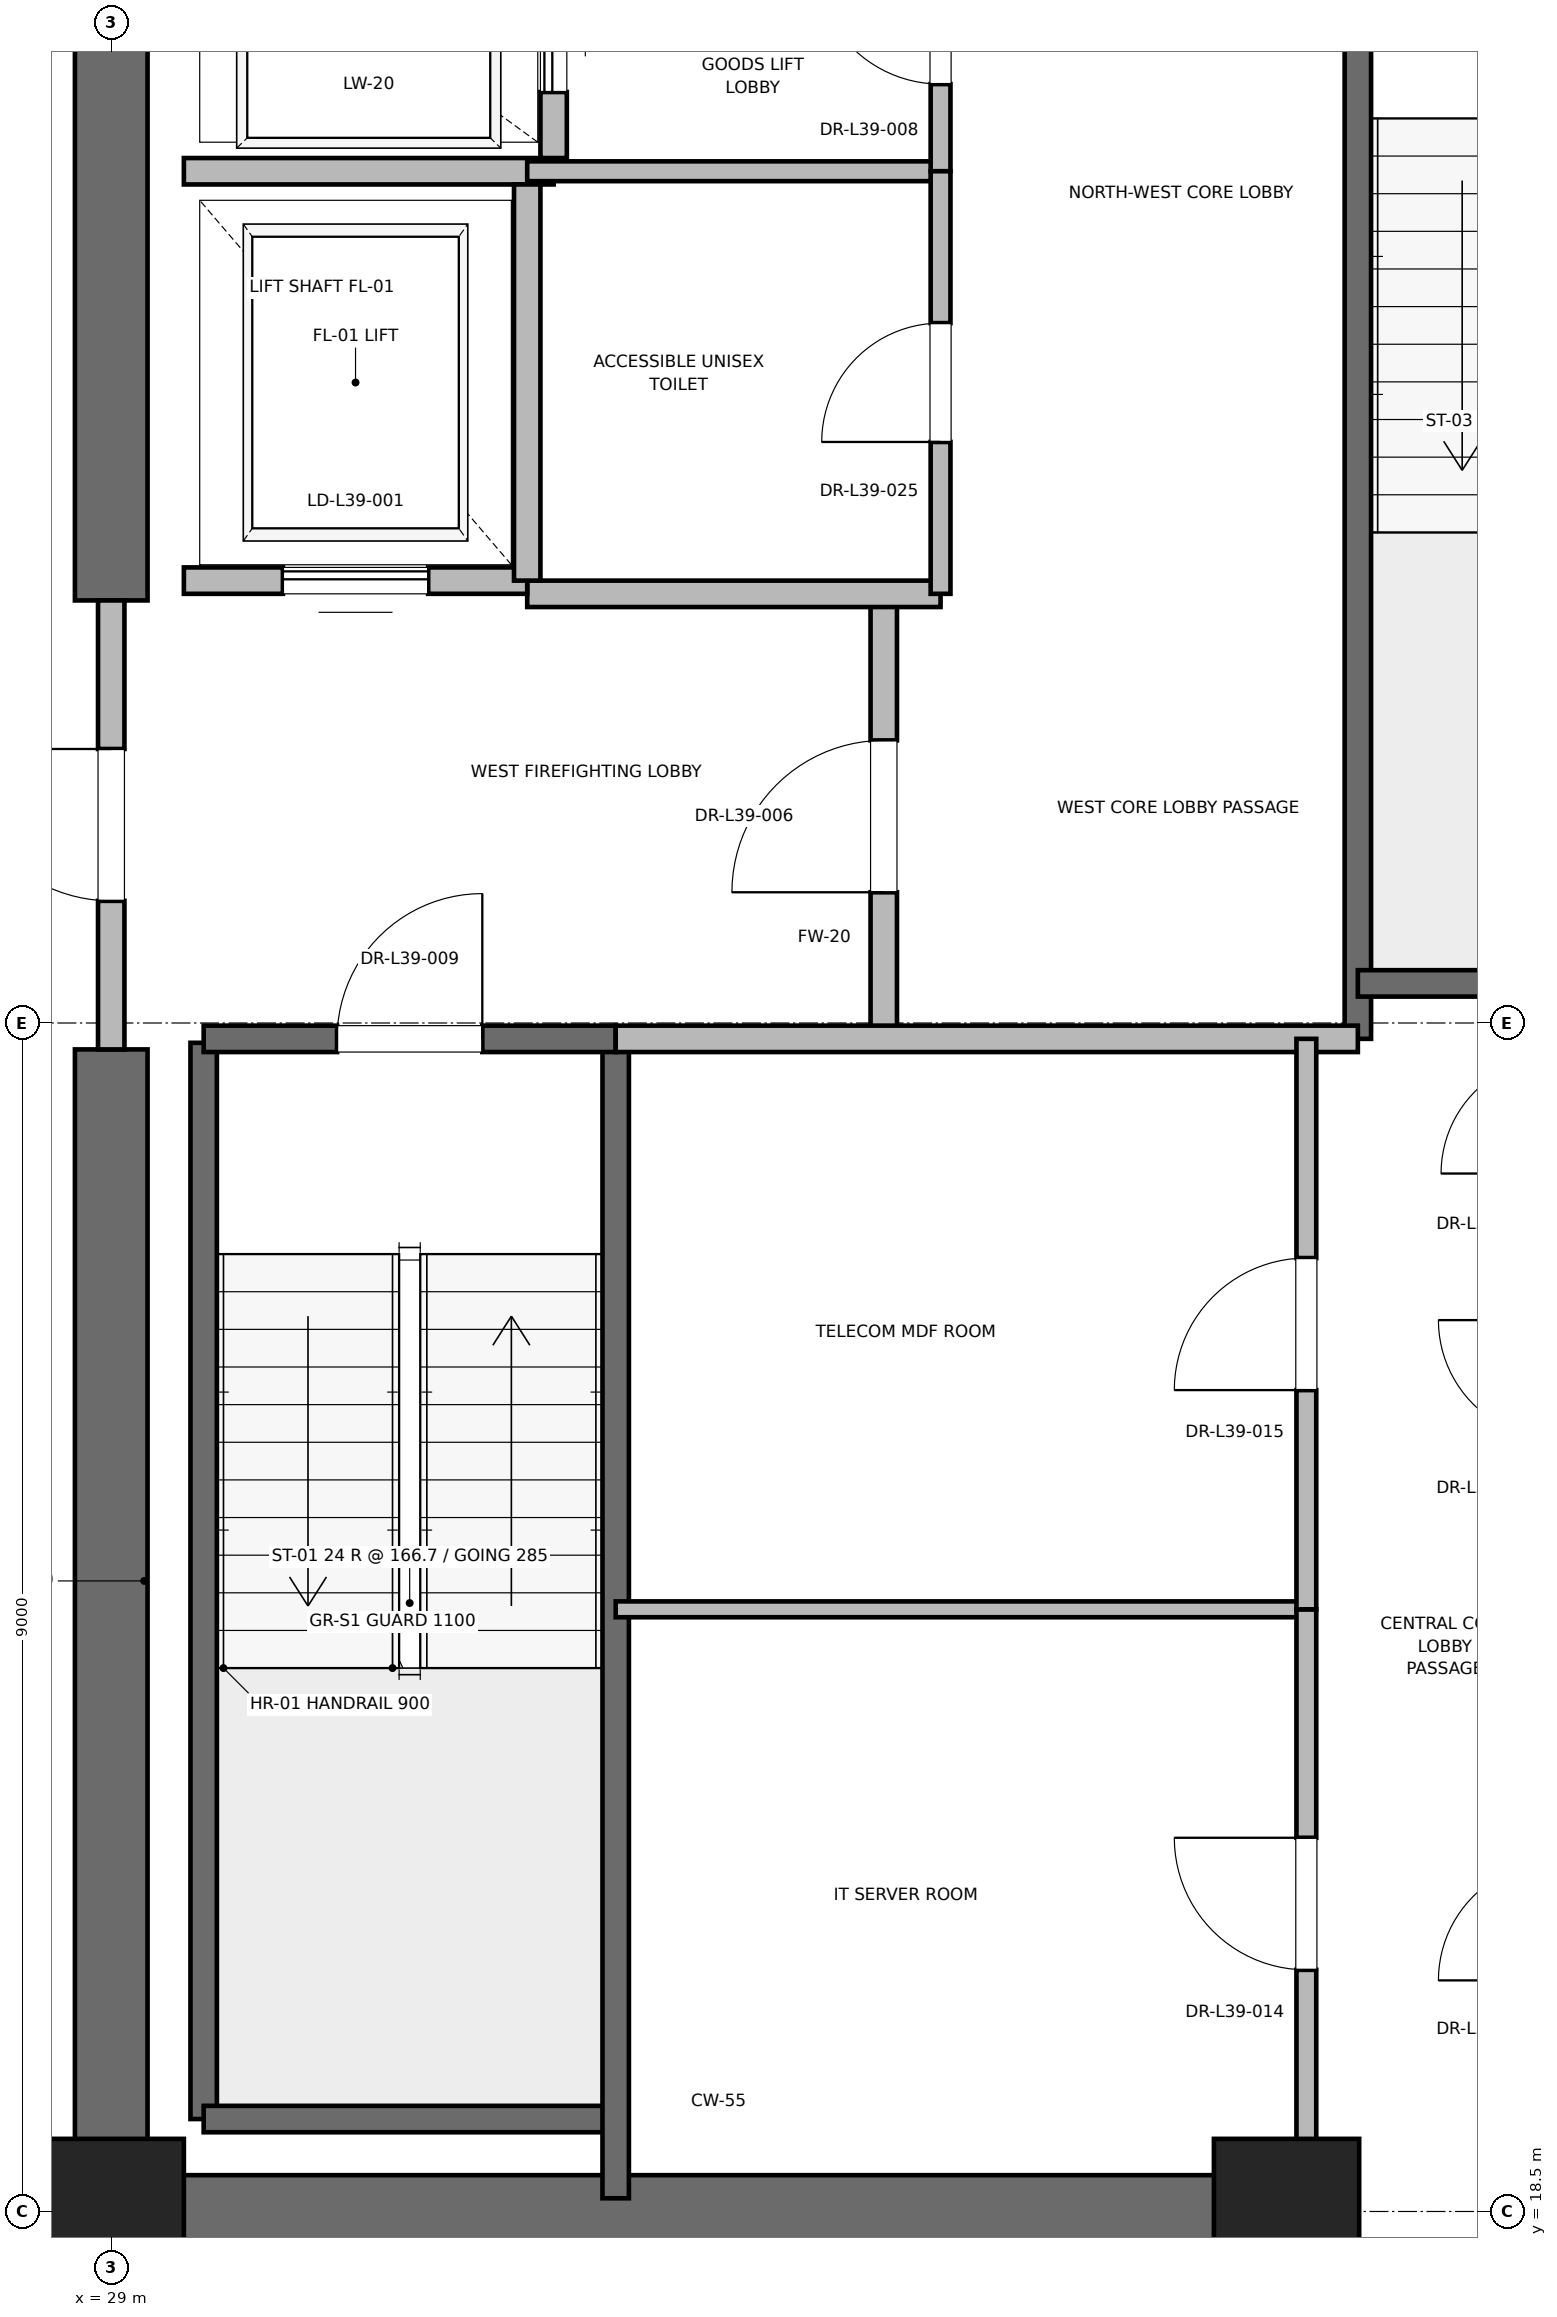
"""IFC4 building model, lengths in metres.
Left out: names, types, materials, properties, quantities, classifications, styles, units other than length and angle.
Written with IfcOpenShell. Run it as: python <this file> out.ifc"""

import sys

from ifc_helpers import new_model, si_unit, direction, frame, frame_2d, origin, origin_2d, place, context, subcontext, project, spatial, rectangle, extrude, element, fill, save


model = new_model("IFC4")
c1 = context("Model", 3, precision=1e-05, world=origin(), true_north=direction((0.0, 1.0)))
c2 = subcontext(c1, "Body", "Model", "MODEL_VIEW")
j1 = project(units=[si_unit("LENGTHUNIT", "METRE"), si_unit("PLANEANGLEUNIT", "RADIAN")], contexts=[c1])
p1 = place(None, origin())
s1 = spatial("IfcSite", under=j1, at=p1, CompositionType="ELEMENT")
p2 = place(p1, origin())
s2 = spatial("IfcBuilding", under=s1, at=p2, CompositionType="ELEMENT")
p3 = place(p2, frame((0.0, 0.0, 168.4)))
s3 = spatial("IfcBuildingStorey", under=s2, at=p3, CompositionType="ELEMENT", Elevation=168.4)
for number, where, z_axis, x_axis in (
    (1, (29.0, 18.5, 0.0), (0.0, 0.0, 1.0), (1.0, 0.0, 0.0)),
    (2, (37.9, 18.5, 0.0), (0.0, 0.0, 1.0), (1.0, 0.0, 0.0)),
):
    element("IfcColumn", number, at=place(p3, frame(where, z_axis=z_axis, x_axis=x_axis)), inside=s3, PredefinedType="PILASTER", context=c2, shape_type="SweptSolid", body=[
        extrude(rectangle(XDim=1.1, YDim=1.1, at=origin_2d()), origin(), (0.0, 0.0, 1.0), 4.0),
    ])
p4 = place(p3, frame((29.0, 18.5, 0.0), z_axis=(0.0, 0.0, 1.0), x_axis=(1.0, 0.0, 0.0)))
e3 = element("IfcWall", 3, at=p4, inside=s3, PredefinedType="SHEAR", context=c2, shape_type="SweptSolid", body=[
    extrude(rectangle(XDim=9.2, YDim=0.55, at=frame_2d((4.6, 0.0))), origin(), (0.0, 0.0, 1.0), 3.775),
])
p5 = place(p3, frame((29.0, 18.5, 0.0), z_axis=(0.0, 0.0, 1.0), x_axis=(0.0, 1.0, 0.0)))
e4 = element("IfcWall", 4, at=p5, inside=s3, PredefinedType="SHEAR", context=c2, shape_type="SweptSolid", body=[
    extrude(rectangle(XDim=8.8, YDim=0.55, at=frame_2d((4.4, 0.0))), origin(), (0.0, 0.0, 1.0), 3.775),
])
p6 = place(p3, frame((29.0, 30.7, 0.0), z_axis=(0.0, 0.0, 1.0), x_axis=(0.0, 1.0, 0.0)))
e5 = element("IfcWall", 5, at=p6, inside=s3, PredefinedType="SHEAR", context=c2, shape_type="SweptSolid", body=[
    extrude(rectangle(XDim=5.8, YDim=0.55, at=frame_2d((2.9, 0.0))), origin(), (0.0, 0.0, 1.0), 3.775),
])
p7 = place(p3, frame((29.7, 19.2, 0.0), z_axis=(0.0, 0.0, 1.0), x_axis=(0.0, 1.0, 0.0)))
e6 = element("IfcWall", 6, at=p7, inside=s3, PredefinedType="SOLIDWALL", context=c2, shape_type="SweptSolid", body=[
    extrude(rectangle(XDim=8.15, YDim=0.2, at=frame_2d((4.075, 0.0))), origin(), (0.0, 0.0, 1.0), 3.775),
])
p8 = place(p3, frame((29.7, 19.2, 0.0), z_axis=(0.0, 0.0, 1.0), x_axis=(1.0, 0.0, 0.0)))
e7 = element("IfcWall", 7, at=p8, inside=s3, PredefinedType="SOLIDWALL", context=c2, shape_type="SweptSolid", body=[
    extrude(rectangle(XDim=3.12, YDim=0.2, at=frame_2d((1.56, 0.0))), origin(), (0.0, 0.0, 1.0), 3.775),
])
p9 = place(p3, frame((32.82, 18.6, 0.0), z_axis=(0.0, 0.0, 1.0), x_axis=(0.0, 1.0, 0.0)))
e8 = element("IfcWall", 8, at=p9, inside=s3, PredefinedType="SOLIDWALL", context=c2, shape_type="SweptSolid", body=[
    extrude(rectangle(XDim=8.78, YDim=0.2, at=frame_2d((4.39, 0.0))), origin(), (0.0, 0.0, 1.0), 3.775),
])
p10 = place(p3, frame((29.7, 27.38, 0.0), z_axis=(0.0, 0.0, 1.0), x_axis=(1.0, 0.0, 0.0)))
e9 = element("IfcWall", 9, at=p10, inside=s3, PredefinedType="SOLIDWALL", context=c2, shape_type="SweptSolid", body=[
    extrude(rectangle(XDim=3.12, YDim=0.2, at=frame_2d((1.56, 0.0))), origin(), (0.0, 0.0, 1.0), 3.775),
])
p11 = place(p10, frame((1.01, 0.0, 0.0)))
e10 = element("IfcOpeningElement", 10, at=p11, cuts=e9, PredefinedType="OPENING", context=c2, shape_type="SweptSolid", body=[
    extrude(rectangle(XDim=1.1, YDim=2.15, at=frame_2d((0.55, 1.075))), frame((0.0, 0.1, 0.0), z_axis=(0.0, -1.0, 0.0), x_axis=(1.0, 0.0, 0.0)), (0.0, 0.0, 1.0), 0.2),
])
p12 = place(p3, frame((38.44, 27.38, 0.0), z_axis=(0.0, 0.0, 1.0), x_axis=(0.0, 1.0, 0.0)))
e11 = element("IfcWall", 11, at=p12, inside=s3, PredefinedType="SOLIDWALL", context=c2, shape_type="SweptSolid", body=[
    extrude(rectangle(XDim=8.87, YDim=0.2, at=frame_2d((4.435, 0.0))), origin(), (0.0, 0.0, 1.0), 3.775),
])
p13 = place(p3, frame((38.44, 27.8, 0.0), z_axis=(0.0, 0.0, 1.0), x_axis=(1.0, 0.0, 0.0)))
e12 = element("IfcWall", 12, at=p13, inside=s3, PredefinedType="SOLIDWALL", context=c2, shape_type="SweptSolid", body=[
    extrude(rectangle(XDim=3.32, YDim=0.2, at=frame_2d((1.66, 0.0))), origin(), (0.0, 0.0, 1.0), 3.775),
])
p14 = place(p3, frame((34.85, 27.38, 0.0), z_axis=(0.0, 0.0, 1.0), x_axis=(0.0, 1.0, 0.0)))
e13 = element("IfcWall", 13, at=p14, inside=s3, PredefinedType="PARTITIONING", context=c2, shape_type="SweptSolid", body=[
    extrude(rectangle(XDim=3.37, YDim=0.2, at=frame_2d((1.685, 0.0))), origin(), (0.0, 0.0, 1.0), 3.775),
])
p15 = place(p14, frame((1.11, 0.0, 0.0)))
e14 = element("IfcOpeningElement", 14, at=p15, cuts=e13, PredefinedType="OPENING", context=c2, shape_type="SweptSolid", body=[
    extrude(rectangle(XDim=1.15, YDim=2.2, at=frame_2d((0.575, 1.1))), frame((0.0, 0.1, 0.0), z_axis=(0.0, -1.0, 0.0), x_axis=(1.0, 0.0, 0.0)), (0.0, 0.0, 1.0), 0.2),
])
p16 = place(p3, frame((29.0, 27.3, 0.0), z_axis=(0.0, 0.0, 1.0), x_axis=(0.0, 1.0, 0.0)))
e15 = element("IfcWall", 15, at=p16, inside=s3, PredefinedType="PARTITIONING", context=c2, shape_type="SweptSolid", body=[
    extrude(rectangle(XDim=3.4, YDim=0.2, at=frame_2d((1.7, 0.0))), origin(), (0.0, 0.0, 1.0), 2.755),
])
p17 = place(p16, frame((1.125, 0.0, 0.0)))
e16 = element("IfcOpeningElement", 16, at=p17, cuts=e15, PredefinedType="OPENING", context=c2, shape_type="SweptSolid", body=[
    extrude(rectangle(XDim=1.15, YDim=2.2, at=frame_2d((0.575, 1.1))), frame((0.0, 0.1, 0.0), z_axis=(0.0, -1.0, 0.0), x_axis=(1.0, 0.0, 0.0)), (0.0, 0.0, 1.0), 0.2),
])
p18 = place(p3, frame((32.82, 27.38, 0.0), z_axis=(0.0, 0.0, 1.0), x_axis=(1.0, 0.0, 0.0)))
e17 = element("IfcWall", 17, at=p18, inside=s3, PredefinedType="PARTITIONING", context=c2, shape_type="SweptSolid", body=[
    extrude(rectangle(XDim=5.62, YDim=0.2, at=frame_2d((2.81, 0.0))), origin(), (0.0, 0.0, 1.0), 3.775),
])
p19 = place(p3, frame((32.15, 30.75, 0.0), z_axis=(0.0, 0.0, 1.0), x_axis=(1.0, 0.0, 0.0)))
e18 = element("IfcWall", 18, at=p19, inside=s3, PredefinedType="PARTITIONING", context=c2, shape_type="SweptSolid", body=[
    extrude(rectangle(XDim=3.13, YDim=0.2, at=frame_2d((1.565, 0.0))), origin(), (0.0, 0.0, 1.0), 3.775),
])
p20 = place(p3, frame((29.55, 30.85, 0.0), z_axis=(0.0, 0.0, 1.0), x_axis=(1.0, 0.0, 0.0)))
e19 = element("IfcWall", 19, at=p20, inside=s3, PredefinedType="SOLIDWALL", context=c2, shape_type="SweptSolid", body=[
    extrude(rectangle(XDim=2.6, YDim=0.2, at=frame_2d((1.3, 0.0))), origin(), (0.0, 0.0, 1.0), 2.755),
])
p21 = place(p20, frame((0.75, 0.0, 0.0)))
e20 = element("IfcOpeningElement", 20, at=p21, cuts=e19, PredefinedType="OPENING", context=c2, shape_type="SweptSolid", body=[
    extrude(rectangle(XDim=1.1, YDim=2.2, at=frame_2d((0.55, 1.1))), frame((0.0, 0.1, 0.0), z_axis=(0.0, -1.0, 0.0), x_axis=(1.0, 0.0, 0.0)), (0.0, 0.0, 1.0), 0.2),
])
p22 = place(p3, frame((29.55, 33.95, 0.0), z_axis=(0.0, 0.0, 1.0), x_axis=(1.0, 0.0, 0.0)))
e21 = element("IfcWall", 21, at=p22, inside=s3, PredefinedType="SOLIDWALL", context=c2, shape_type="SweptSolid", body=[
    extrude(rectangle(XDim=2.8, YDim=0.2, at=frame_2d((1.4, 0.0))), origin(), (0.0, 0.0, 1.0), 3.775),
])
p23 = place(p3, frame((32.15, 30.85, 0.0), z_axis=(0.0, 0.0, 1.0), x_axis=(0.0, 1.0, 0.0)))
e22 = element("IfcWall", 22, at=p23, inside=s3, PredefinedType="SOLIDWALL", context=c2, shape_type="SweptSolid", body=[
    extrude(rectangle(XDim=3.0, YDim=0.2, at=frame_2d((1.5, 0.0))), origin(), (0.0, 0.0, 1.0), 3.775),
])
p24 = place(p3, frame((32.35, 34.05, 0.0), z_axis=(0.0, 0.0, 1.0), x_axis=(0.0, 1.0, 0.0)))
e23 = element("IfcWall", 23, at=p24, inside=s3, PredefinedType="SOLIDWALL", context=c2, shape_type="SweptSolid", body=[
    extrude(rectangle(XDim=2.1, YDim=0.2, at=frame_2d((1.05, 0.0))), origin(), (0.0, 0.0, 1.0), 3.775),
])
p25 = place(p24, frame((0.5, 0.0, 0.0)))
e24 = element("IfcOpeningElement", 24, at=p25, cuts=e23, PredefinedType="OPENING", context=c2, shape_type="SweptSolid", body=[
    extrude(rectangle(XDim=1.1, YDim=2.2, at=frame_2d((0.55, 1.1))), frame((0.0, 0.1, 0.0), z_axis=(0.0, -1.0, 0.0), x_axis=(1.0, 0.0, 0.0)), (0.0, 0.0, 1.0), 0.2),
])
p26 = place(p3, frame((32.15, 33.95, 0.0), z_axis=(0.0, 0.0, 1.0), x_axis=(1.0, 0.0, 0.0)))
e25 = element("IfcWall", 25, at=p26, inside=s3, PredefinedType="PARTITIONING", context=c2, shape_type="SweptSolid", body=[
    extrude(rectangle(XDim=3.13, YDim=0.15, at=frame_2d((1.565, 0.0))), origin(), (0.0, 0.0, 1.0), 2.85),
])
p27 = place(p3, frame((35.28, 33.95, 0.0), z_axis=(0.0, 0.0, 1.0), x_axis=(0.0, 1.0, 0.0)))
e26 = element("IfcWall", 26, at=p27, inside=s3, PredefinedType="PARTITIONING", context=c2, shape_type="SweptSolid", body=[
    extrude(rectangle(XDim=2.27, YDim=0.15, at=frame_2d((1.135, 0.0))), origin(), (0.0, 0.0, 1.0), 2.755),
])
p28 = place(p27, frame((0.66, 0.0, 0.0)))
e27 = element("IfcOpeningElement", 27, at=p28, cuts=e26, PredefinedType="OPENING", context=c2, shape_type="SweptSolid", body=[
    extrude(rectangle(XDim=0.95, YDim=2.15, at=frame_2d((0.475, 1.075))), frame((0.0, 0.075, 0.0), z_axis=(0.0, -1.0, 0.0), x_axis=(1.0, 0.0, 0.0)), (0.0, 0.0, 1.0), 0.15),
])
p29 = place(p3, frame((35.28, 30.75, 0.0), z_axis=(0.0, 0.0, 1.0), x_axis=(0.0, 1.0, 0.0)))
e28 = element("IfcWall", 28, at=p29, inside=s3, PredefinedType="PARTITIONING", context=c2, shape_type="SweptSolid", body=[
    extrude(rectangle(XDim=3.2, YDim=0.15, at=frame_2d((1.6, 0.0))), origin(), (0.0, 0.0, 1.0), 2.85),
])
p30 = place(p29, frame((1.15, 0.0, 0.0)))
e29 = element("IfcOpeningElement", 29, at=p30, cuts=e28, PredefinedType="OPENING", context=c2, shape_type="SweptSolid", body=[
    extrude(rectangle(XDim=0.9, YDim=2.1, at=frame_2d((0.45, 1.05))), frame((0.0, 0.075, 0.0), z_axis=(0.0, -1.0, 0.0), x_axis=(1.0, 0.0, 0.0)), (0.0, 0.0, 1.0), 0.15),
])
p31 = place(p3, frame((32.82, 23.06, 0.0), z_axis=(0.0, 0.0, 1.0), x_axis=(1.0, 0.0, 0.0)))
e30 = element("IfcWall", 30, at=p31, inside=s3, PredefinedType="PARTITIONING", context=c2, shape_type="SweptSolid", body=[
    extrude(rectangle(XDim=5.23, YDim=0.12, at=frame_2d((2.615, 0.0))), origin(), (0.0, 0.0, 1.0), 2.85),
])
p32 = place(p3, frame((38.05, 18.6, 0.0), z_axis=(0.0, 0.0, 1.0), x_axis=(0.0, 1.0, 0.0)))
e31 = element("IfcWall", 31, at=p32, inside=s3, PredefinedType="PARTITIONING", context=c2, shape_type="SweptSolid", body=[
    extrude(rectangle(XDim=4.46, YDim=0.15, at=frame_2d((2.23, 0.0))), origin(), (0.0, 0.0, 1.0), 2.755),
])
p33 = place(p32, frame((1.73, 0.0, 0.0)))
e32 = element("IfcOpeningElement", 32, at=p33, cuts=e31, PredefinedType="OPENING", context=c2, shape_type="SweptSolid", body=[
    extrude(rectangle(XDim=1.0, YDim=2.15, at=frame_2d((0.5, 1.075))), frame((0.0, 0.075, 0.0), z_axis=(0.0, -1.0, 0.0), x_axis=(1.0, 0.0, 0.0)), (0.0, 0.0, 1.0), 0.15),
])
p34 = place(p3, frame((38.05, 23.06, 0.0), z_axis=(0.0, 0.0, 1.0), x_axis=(0.0, 1.0, 0.0)))
e33 = element("IfcWall", 33, at=p34, inside=s3, PredefinedType="PARTITIONING", context=c2, shape_type="SweptSolid", body=[
    extrude(rectangle(XDim=4.32, YDim=0.15, at=frame_2d((2.16, 0.0))), origin(), (0.0, 0.0, 1.0), 2.85),
])
p35 = place(p34, frame((1.66, 0.0, 0.0)))
e34 = element("IfcOpeningElement", 34, at=p35, cuts=e33, PredefinedType="OPENING", context=c2, shape_type="SweptSolid", body=[
    extrude(rectangle(XDim=1.0, YDim=2.15, at=frame_2d((0.5, 1.075))), frame((0.0, 0.075, 0.0), z_axis=(0.0, -1.0, 0.0), x_axis=(1.0, 0.0, 0.0)), (0.0, 0.0, 1.0), 0.15),
])
p36 = place(p11, origin())
e35 = element("IfcDoor", 35, at=p36, inside=s3, OperationType="SINGLE_SWING_RIGHT", PredefinedType="DOOR", context=c2, shape_type="SweptSolid", body=[
    extrude(rectangle(XDim=1.1, YDim=2.15, at=frame_2d((0.55, 1.075))), frame((0.0, 0.025, 0.0), z_axis=(0.0, -1.0, 0.0), x_axis=(1.0, 0.0, 0.0)), (0.0, 0.0, 1.0), 0.05),
])
fill(e10, e35)
p37 = place(p15, origin())
e36 = element("IfcDoor", 36, at=p37, inside=s3, OperationType="SINGLE_SWING_LEFT", PredefinedType="DOOR", context=c2, shape_type="SweptSolid", body=[
    extrude(rectangle(XDim=1.15, YDim=2.2, at=frame_2d((0.575, 1.1))), frame((0.0, 0.025, 0.0), z_axis=(0.0, -1.0, 0.0), x_axis=(1.0, 0.0, 0.0)), (0.0, 0.0, 1.0), 0.05),
])
fill(e14, e36)
p38 = place(p17, origin())
e37 = element("IfcDoor", 37, at=p38, inside=s3, OperationType="SINGLE_SWING_RIGHT", PredefinedType="DOOR", context=c2, shape_type="SweptSolid", body=[
    extrude(rectangle(XDim=1.15, YDim=2.2, at=frame_2d((0.575, 1.1))), frame((0.0, 0.025, 0.0), z_axis=(0.0, -1.0, 0.0), x_axis=(1.0, 0.0, 0.0)), (0.0, 0.0, 1.0), 0.05),
])
fill(e16, e37)
p39 = place(p21, origin())
e38 = element("IfcDoor", 38, at=p39, inside=s3, OperationType="SLIDING_TO_RIGHT", PredefinedType="DOOR", context=c2, shape_type="SweptSolid", body=[
    extrude(rectangle(XDim=1.1, YDim=2.2, at=frame_2d((0.55, 1.1))), frame((0.0, 0.025, 0.0), z_axis=(0.0, -1.0, 0.0), x_axis=(1.0, 0.0, 0.0)), (0.0, 0.0, 1.0), 0.05),
])
fill(e20, e38)
p40 = place(p25, origin())
e39 = element("IfcDoor", 39, at=p40, inside=s3, OperationType="SLIDING_TO_RIGHT", PredefinedType="DOOR", context=c2, shape_type="SweptSolid", body=[
    extrude(rectangle(XDim=1.1, YDim=2.2, at=frame_2d((0.55, 1.1))), frame((0.0, 0.025, 0.0), z_axis=(0.0, -1.0, 0.0), x_axis=(1.0, 0.0, 0.0)), (0.0, 0.0, 1.0), 0.05),
])
fill(e24, e39)
p41 = place(p28, origin())
e40 = element("IfcDoor", 40, at=p41, inside=s3, OperationType="SINGLE_SWING_RIGHT", PredefinedType="DOOR", context=c2, shape_type="SweptSolid", body=[
    extrude(rectangle(XDim=0.95, YDim=2.15, at=frame_2d((0.475, 1.075))), frame((0.0, 0.025, 0.0), z_axis=(0.0, -1.0, 0.0), x_axis=(1.0, 0.0, 0.0)), (0.0, 0.0, 1.0), 0.05),
])
fill(e27, e40)
p42 = place(p30, origin())
e41 = element("IfcDoor", 41, at=p42, inside=s3, OperationType="SINGLE_SWING_LEFT", PredefinedType="DOOR", context=c2, shape_type="SweptSolid", body=[
    extrude(rectangle(XDim=0.9, YDim=2.1, at=frame_2d((0.45, 1.05))), frame((0.0, 0.025, 0.0), z_axis=(0.0, -1.0, 0.0), x_axis=(1.0, 0.0, 0.0)), (0.0, 0.0, 1.0), 0.05),
])
fill(e29, e41)
p43 = place(p33, origin())
e42 = element("IfcDoor", 42, at=p43, inside=s3, OperationType="SINGLE_SWING_RIGHT", PredefinedType="DOOR", context=c2, shape_type="SweptSolid", body=[
    extrude(rectangle(XDim=1.0, YDim=2.15, at=frame_2d((0.5, 1.075))), frame((0.0, 0.025, 0.0), z_axis=(0.0, -1.0, 0.0), x_axis=(1.0, 0.0, 0.0)), (0.0, 0.0, 1.0), 0.05),
])
fill(e32, e42)
p44 = place(p35, origin())
e43 = element("IfcDoor", 43, at=p44, inside=s3, OperationType="SINGLE_SWING_LEFT", PredefinedType="DOOR", context=c2, shape_type="SweptSolid", body=[
    extrude(rectangle(XDim=1.0, YDim=2.15, at=frame_2d((0.5, 1.075))), frame((0.0, 0.025, 0.0), z_axis=(0.0, -1.0, 0.0), x_axis=(1.0, 0.0, 0.0)), (0.0, 0.0, 1.0), 0.05),
])
fill(e34, e43)
save(model, sys.argv[1])
